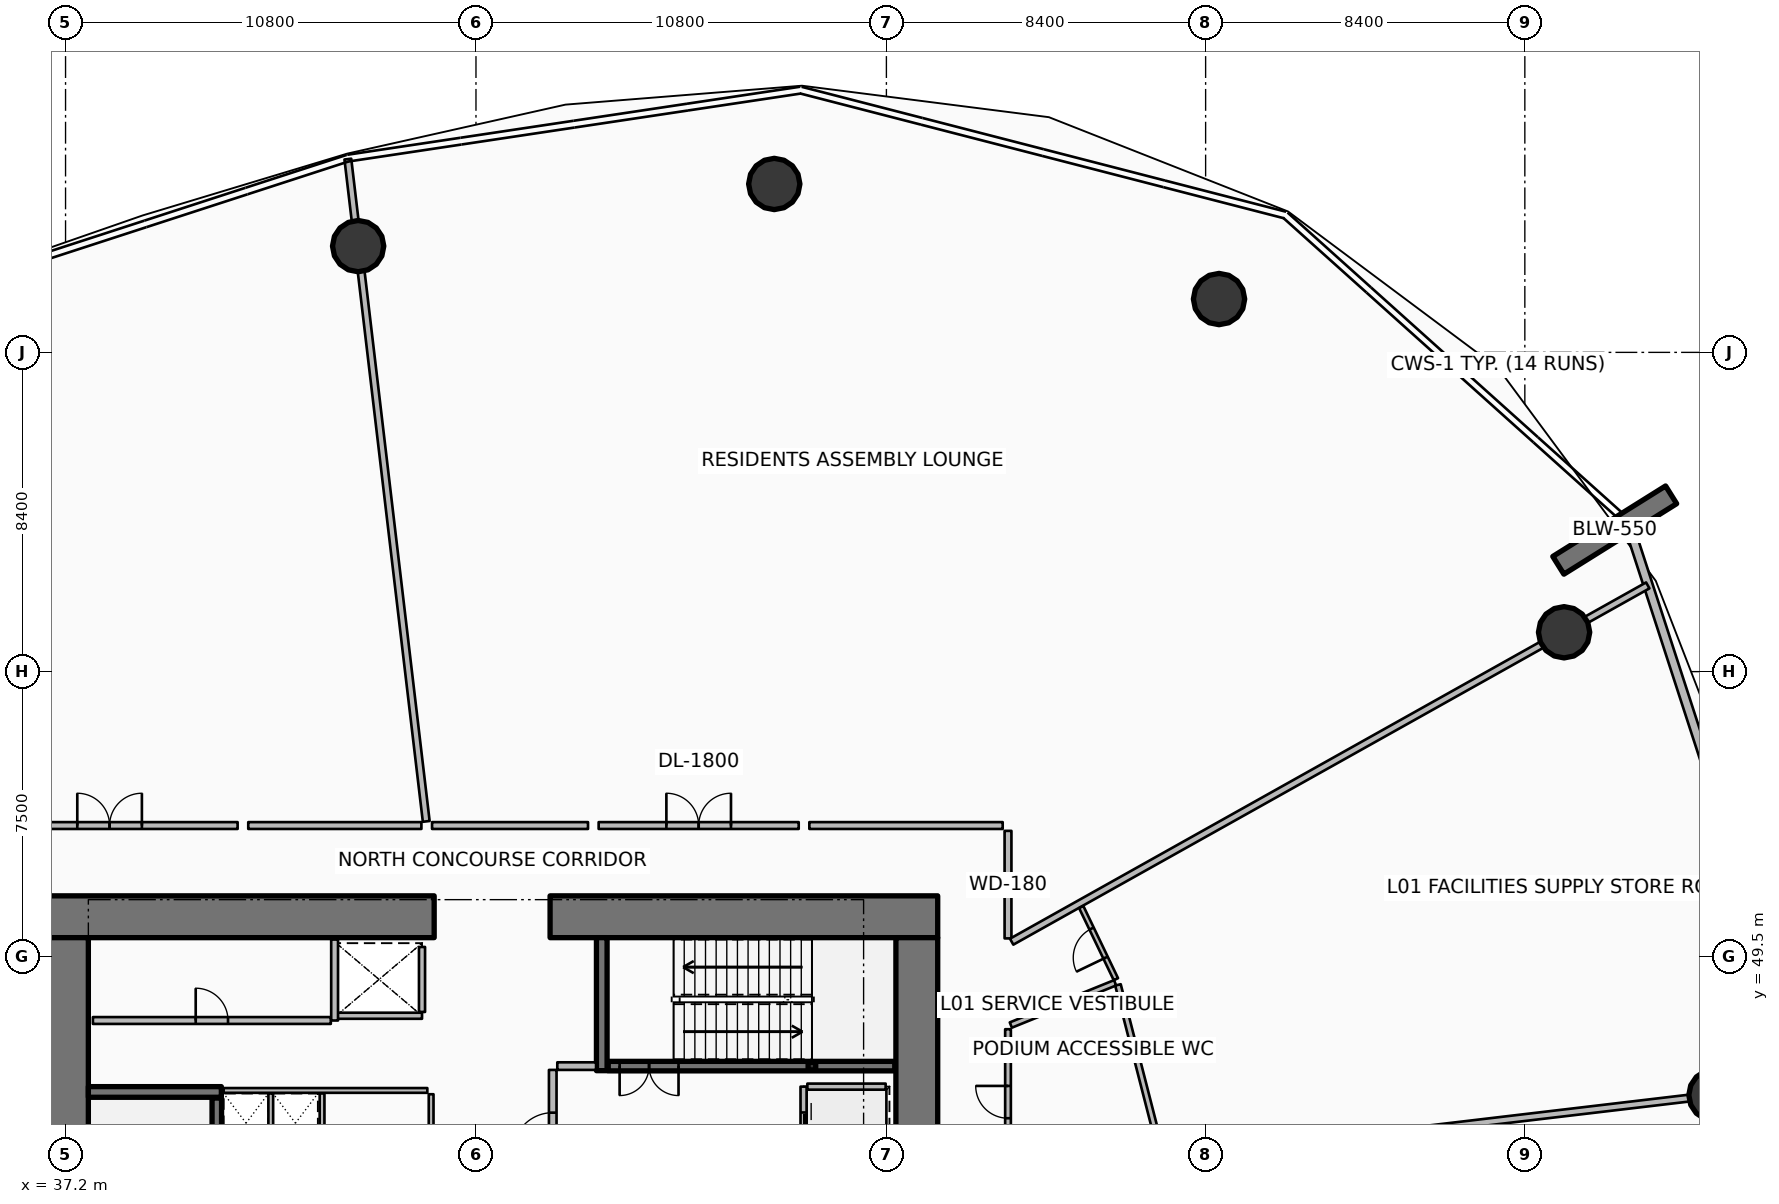
"""IFC4 building model, lengths in metres.
Left out: names, types, materials, properties, quantities, classifications, styles, units other than length and angle.
Written with IfcOpenShell. Run it as: python <this file> out.ifc"""

import sys

from ifc_helpers import new_model, si_unit, direction, frame, frame_2d, origin, origin_2d, place, context, subcontext, project, spatial, rectangle, hollow_rectangle, circle, extrude, element, fill, save


model = new_model("IFC4")
c1 = context("Model", 3, precision=1e-05, world=origin(), true_north=direction((0.0, 1.0)))
c2 = subcontext(c1, "Body", "Model", "MODEL_VIEW")
j1 = project(units=[si_unit("LENGTHUNIT", "METRE"), si_unit("PLANEANGLEUNIT", "RADIAN")], contexts=[c1])
p1 = place(None, origin())
s1 = spatial("IfcSite", under=j1, at=p1, CompositionType="ELEMENT")
p2 = place(p1, origin())
s2 = spatial("IfcBuilding", under=s1, at=p2, CompositionType="ELEMENT")
p3 = place(p2, frame((0.0, 0.0, 7.2)))
s3 = spatial("IfcBuildingStorey", under=s2, at=p3, CompositionType="ELEMENT", Elevation=7.2)
for number, where, z_axis, x_axis in (
    (1, (36.7, 50.55, 0.0), (0.0, 0.0, 1.0), (1.0, 0.0, 0.0)),
    (2, (49.95, 50.55, 0.0), (0.0, 0.0, 1.0), (1.0, 0.0, 0.0)),
):
    element("IfcWall", number, at=place(p3, frame(where, z_axis=z_axis, x_axis=x_axis)), inside=s3, PredefinedType="SHEAR", context=c2, shape_type="SweptSolid", body=[
        extrude(rectangle(XDim=10.2, YDim=1.1, at=frame_2d((5.1, 0.0))), origin(), (0.0, 0.0, 1.0), 4.8),
    ])
for number, where, z_axis, x_axis in (
    (3, (37.25, 34.0, 0.0), (0.0, 0.0, 1.0), (0.0, 1.0, 0.0)),
    (4, (59.6, 34.0, 0.0), (0.0, 0.0, 1.0), (0.0, 1.0, 0.0)),
):
    element("IfcWall", number, at=place(p3, frame(where, z_axis=z_axis, x_axis=x_axis)), inside=s3, PredefinedType="SHEAR", context=c2, shape_type="SweptSolid", body=[
        extrude(rectangle(XDim=16.0, YDim=1.1, at=frame_2d((8.0, 0.0))), origin(), (0.0, 0.0, 1.0), 4.8),
    ])
for number, where, z_axis, x_axis in (
    (5, (37.8, 45.94, 0.0), (0.0, 0.0, 1.0), (1.0, 0.0, 0.0)),
    (6, (51.31, 46.5, 0.0), (0.0, 0.0, 1.0), (0.0, 1.0, 0.0)),
):
    element("IfcWall", number, at=place(p3, frame(where, z_axis=z_axis, x_axis=x_axis)), inside=s3, PredefinedType="SHEAR", context=c2, shape_type="SweptSolid", body=[
        extrude(rectangle(XDim=3.5, YDim=0.28, at=frame_2d((1.75, 0.0))), origin(), (0.0, 0.0, 1.0), 4.8),
    ])
p4 = place(p3, frame((56.84, 46.62, 0.0), z_axis=(0.0, 0.0, 1.0), x_axis=(1.0, 0.0, 0.0)))
e7 = element("IfcColumn", 7, at=p4, inside=s3, PredefinedType="COLUMN", context=c2, shape_type="SweptSolid", body=[
    extrude(hollow_rectangle(XDim=0.2, YDim=0.2, WallThickness=0.01, InnerFilletRadius=0.01, OuterFilletRadius=0.02, at=origin_2d()), origin(), (0.0, 0.0, 1.0), 2.195),
])
p5 = place(p3, frame((76.481, 59.797, 0.0), z_axis=(0.0, 0.0, 1.0), x_axis=(0.848053161125, 0.529911158502, 0.0)))
e8 = element("IfcWall", 8, at=p5, inside=s3, PredefinedType="SOLIDWALL", context=c2, shape_type="SweptSolid", body=[
    extrude(rectangle(XDim=3.5, YDim=0.55, at=frame_2d((1.75, 0.0))), origin(), (0.0, 0.0, 1.0), 4.8),
])
for number, where, z_axis, x_axis in (
    (9, (76.633, 58.035, 0.0), (0.0, 0.0, 1.0), (1.0, 0.0, 0.0)),
    (10, (67.553, 66.803, 0.0), (0.0, 0.0, 1.0), (1.0, 0.0, 0.0)),
    (11, (55.849, 69.831, 0.0), (0.0, 0.0, 1.0), (1.0, 0.0, 0.0)),
    (12, (44.899, 68.196, 0.0), (0.0, 0.0, 1.0), (1.0, 0.0, 0.0)),
    (13, (80.59, 45.857, 0.0), (0.0, 0.0, 1.0), (1.0, 0.0, 0.0)),
):
    element("IfcColumn", number, at=place(p3, frame(where, z_axis=z_axis, x_axis=x_axis)), inside=s3, PredefinedType="COLUMN", context=c2, shape_type="SweptSolid", body=[
        extrude(circle(Radius=0.675, at=origin_2d()), origin(), (0.0, 0.0, 1.0), 4.48),
    ])
p6 = place(p3, frame((83.573, 44.725, 0.0), z_axis=(0.0, 0.0, 1.0), x_axis=(-0.309022005354, 0.951054888115, 0.0)))
e14 = element("IfcWall", 14, at=p6, inside=s3, PredefinedType="SOLIDWALL", context=c2, shape_type="SweptSolid", body=[
    extrude(rectangle(XDim=16.803, YDim=0.24, at=frame_2d((8.401, 0.0))), origin(), (0.0, 0.0, 1.0), 3.43),
])
p7 = place(p6, frame((7.201, 0.0, 0.85)))
e15 = element("IfcOpeningElement", 15, at=p7, cuts=e14, PredefinedType="OPENING", context=c2, shape_type="SweptSolid", body=[
    extrude(rectangle(XDim=2.4, YDim=2.1, at=frame_2d((1.2, 1.05))), frame((0.0, 0.13, 0.0), z_axis=(0.0, -1.0, 0.0), x_axis=(1.0, 0.0, 0.0)), (0.0, 0.0, 1.0), 0.26),
])
p8 = place(p3, frame((41.18, 38.22, 0.0), z_axis=(0.0, 0.0, 1.0), x_axis=(0.0, 1.0, 0.0)))
e16 = element("IfcWall", 16, at=p8, inside=s3, PredefinedType="SOLIDWALL", context=c2, shape_type="SweptSolid", body=[
    extrude(rectangle(XDim=7.56, YDim=0.25, at=frame_2d((3.78, 0.0))), origin(), (0.0, 0.0, 1.0), 4.48),
])
p9 = place(p8, frame((0.3, 0.0, 0.0)))
e17 = element("IfcOpeningElement", 17, at=p9, cuts=e16, PredefinedType="OPENING", context=c2, shape_type="SweptSolid", body=[
    extrude(rectangle(XDim=1.55, YDim=2.15, at=frame_2d((0.775, 1.075))), frame((0.0, 0.135, 0.0), z_axis=(0.0, -1.0, 0.0), x_axis=(1.0, 0.0, 0.0)), (0.0, 0.0, 1.0), 0.27),
])
p10 = place(p3, frame((51.48, 46.62, 0.0), z_axis=(0.0, 0.0, 1.0), x_axis=(1.0, 0.0, 0.0)))
e18 = element("IfcWall", 18, at=p10, inside=s3, PredefinedType="SOLIDWALL", context=c2, shape_type="SweptSolid", body=[
    extrude(rectangle(XDim=7.54, YDim=0.25, at=frame_2d((3.77, 0.0))), origin(), (0.0, 0.0, 1.0), 4.48),
])
p11 = place(p10, frame((0.3, 0.0, 0.0)))
e19 = element("IfcOpeningElement", 19, at=p11, cuts=e18, PredefinedType="OPENING", context=c2, shape_type="SweptSolid", body=[
    extrude(rectangle(XDim=1.55, YDim=2.15, at=frame_2d((0.775, 1.075))), frame((0.0, 0.135, 0.0), z_axis=(0.0, -1.0, 0.0), x_axis=(1.0, 0.0, 0.0)), (0.0, 0.0, 1.0), 0.27),
])
p12 = place(p3, frame((46.58, 47.945, 0.0), z_axis=(0.0, 0.0, 1.0), x_axis=(-1.0, 0.0, 0.0)))
e20 = element("IfcWall", 20, at=p12, inside=s3, PredefinedType="PARTITIONING", context=c2, shape_type="SweptSolid", body=[
    extrude(rectangle(XDim=2.26, YDim=0.16, at=frame_2d((1.13, 0.0))), origin(), (0.0, 0.0, 1.0), 4.48),
])
p13 = place(p3, frame((46.58, 48.045, 0.0), z_axis=(0.0, 0.0, 1.0), x_axis=(0.0, 1.0, 0.0)))
e21 = element("IfcWall", 21, at=p13, inside=s3, PredefinedType="PARTITIONING", context=c2, shape_type="SweptSolid", body=[
    extrude(rectangle(XDim=1.71, YDim=0.16, at=frame_2d((0.855, 0.0))), origin(), (0.0, 0.0, 1.0), 4.48),
])
p14 = place(p3, frame((56.62, 46.08, 0.0), z_axis=(0.0, 0.0, 1.0), x_axis=(0.0, -1.0, 0.0)))
e22 = element("IfcWall", 22, at=p14, inside=s3, PredefinedType="PARTITIONING", context=c2, shape_type="SweptSolid", body=[
    extrude(rectangle(XDim=2.46, YDim=0.16, at=frame_2d((1.23, 0.0))), origin(), (0.0, 0.0, 1.0), 4.48),
])
p15 = place(p14, frame((0.68, 0.0, 0.0)))
e23 = element("IfcOpeningElement", 23, at=p15, cuts=e22, PredefinedType="OPENING", context=c2, shape_type="SweptSolid", body=[
    extrude(rectangle(XDim=1.1, YDim=2.1, at=frame_2d((0.55, 1.05))), frame((0.0, 0.09, 0.0), z_axis=(0.0, -1.0, 0.0), x_axis=(1.0, 0.0, 0.0)), (0.0, 0.0, 1.0), 0.18),
])
p16 = place(p3, frame((56.72, 46.08, 0.0), z_axis=(0.0, 0.0, 1.0), x_axis=(1.0, 0.0, 0.0)))
e24 = element("IfcWall", 24, at=p16, inside=s3, PredefinedType="PARTITIONING", context=c2, shape_type="SweptSolid", body=[
    extrude(rectangle(XDim=2.06, YDim=0.16, at=frame_2d((1.03, 0.0))), origin(), (0.0, 0.0, 1.0), 4.48),
])
p17 = place(p3, frame((37.92, 47.82, 0.0), z_axis=(0.0, 0.0, 1.0), x_axis=(1.0, 0.0, 0.0)))
e25 = element("IfcWall", 25, at=p17, inside=s3, PredefinedType="PARTITIONING", context=c2, shape_type="SweptSolid", body=[
    extrude(rectangle(XDim=6.26, YDim=0.18, at=frame_2d((3.13, 0.0))), origin(), (0.0, 0.0, 1.0), 4.48),
])
p18 = place(p17, frame((2.705, 0.0, 0.0)))
e26 = element("IfcOpeningElement", 26, at=p18, cuts=e25, PredefinedType="OPENING", context=c2, shape_type="SweptSolid", body=[
    extrude(rectangle(XDim=0.85, YDim=2.06, at=frame_2d((0.425, 1.03))), frame((0.0, 0.1, 0.0), z_axis=(0.0, -1.0, 0.0), x_axis=(1.0, 0.0, 0.0)), (0.0, 0.0, 1.0), 0.2),
])
p19 = place(p3, frame((44.28, 47.82, 0.0), z_axis=(0.0, 0.0, 1.0), x_axis=(0.0, 1.0, 0.0)))
e27 = element("IfcWall", 27, at=p19, inside=s3, PredefinedType="PARTITIONING", context=c2, shape_type="SweptSolid", body=[
    extrude(rectangle(XDim=2.13, YDim=0.18, at=frame_2d((1.065, 0.0))), origin(), (0.0, 0.0, 1.0), 4.48),
])
p20 = place(p3, frame((50.14, 46.62, 0.0), z_axis=(0.0, 0.0, 1.0), x_axis=(1.0, 0.0, 0.0)))
e28 = element("IfcWall", 28, at=p20, inside=s3, PredefinedType="PARTITIONING", context=c2, shape_type="SweptSolid", body=[
    extrude(rectangle(XDim=1.02, YDim=0.2, at=frame_2d((0.51, 0.0))), origin(), (0.0, 0.0, 1.0), 4.48),
])
p21 = place(p3, frame((50.02, 43.22, 0.0), z_axis=(0.0, 0.0, 1.0), x_axis=(0.0, 1.0, 0.0)))
e29 = element("IfcWall", 29, at=p21, inside=s3, PredefinedType="PARTITIONING", context=c2, shape_type="SweptSolid", body=[
    extrude(rectangle(XDim=3.3, YDim=0.2, at=frame_2d((1.65, 0.0))), origin(), (0.0, 0.0, 1.0), 4.48),
])
p22 = place(p21, frame((1.125, 0.0, 0.0)))
e30 = element("IfcOpeningElement", 30, at=p22, cuts=e29, PredefinedType="OPENING", context=c2, shape_type="SweptSolid", body=[
    extrude(rectangle(XDim=1.05, YDim=2.1, at=frame_2d((0.525, 1.05))), frame((0.0, 0.11, 0.0), z_axis=(0.0, -1.0, 0.0), x_axis=(1.0, 0.0, 0.0)), (0.0, 0.0, 1.0), 0.22),
])
p23 = place(p3, frame((41.36, 45.98, 0.0), z_axis=(0.0, 0.0, 1.0), x_axis=(1.0, 0.0, 0.0)))
e31 = element("IfcWall", 31, at=p23, inside=s3, PredefinedType="PARTITIONING", context=c2, shape_type="SweptSolid", body=[
    extrude(rectangle(XDim=5.36, YDim=0.125, at=frame_2d((2.68, 0.0))), origin(), (0.0, 0.0, 1.0), 3.92),
])
p24 = place(p3, frame((42.6, 44.35, 0.0), z_axis=(0.0, 0.0, 1.0), x_axis=(0.0, 1.0, 0.0)))
e32 = element("IfcWall", 32, at=p24, inside=s3, PredefinedType="PARTITIONING", context=c2, shape_type="SweptSolid", body=[
    extrude(rectangle(XDim=1.55, YDim=0.125, at=frame_2d((0.775, 0.0))), origin(), (0.0, 0.0, 1.0), 3.92),
])
p25 = place(p3, frame((43.95, 41.58, 0.0), z_axis=(0.0, 0.0, 1.0), x_axis=(0.0, 1.0, 0.0)))
e33 = element("IfcWall", 33, at=p25, inside=s3, PredefinedType="PARTITIONING", context=c2, shape_type="SweptSolid", body=[
    extrude(rectangle(XDim=4.32, YDim=0.125, at=frame_2d((2.16, 0.0))), origin(), (0.0, 0.0, 1.0), 3.92),
])
p26 = place(p3, frame((46.82, 41.58, 0.0), z_axis=(0.0, 0.0, 1.0), x_axis=(0.0, 1.0, 0.0)))
e34 = element("IfcWall", 34, at=p26, inside=s3, PredefinedType="PARTITIONING", context=c2, shape_type="SweptSolid", body=[
    extrude(rectangle(XDim=4.3, YDim=0.125, at=frame_2d((2.15, 0.0))), origin(), (0.0, 0.0, 1.0), 3.92),
])
p27 = place(p26, frame((1.725, 0.0, 0.0)))
e35 = element("IfcOpeningElement", 35, at=p27, cuts=e34, PredefinedType="OPENING", context=c2, shape_type="SweptSolid", body=[
    extrude(rectangle(XDim=0.85, YDim=2.06, at=frame_2d((0.425, 1.03))), frame((0.0, 0.073, 0.0), z_axis=(0.0, -1.0, 0.0), x_axis=(1.0, 0.0, 0.0)), (0.0, 0.0, 1.0), 0.145),
])
p28 = place(p3, frame((62.0, 49.98, 0.0), z_axis=(0.0, 0.0, 1.0), x_axis=(0.0, 1.0, 0.0)))
e36 = element("IfcWall", 36, at=p28, inside=s3, PredefinedType="PARTITIONING", context=c2, shape_type="SweptSolid", body=[
    extrude(rectangle(XDim=2.83, YDim=0.18, at=frame_2d((1.415, 0.0))), origin(), (0.0, 0.0, 1.0), 3.693),
])
p29 = place(p3, frame((61.86, 52.95, 0.0), z_axis=(0.0, 0.0, 1.0), x_axis=(-1.0, 0.0, 0.0)))
e37 = element("IfcWall", 37, at=p29, inside=s3, PredefinedType="PARTITIONING", context=c2, shape_type="SweptSolid", body=[
    extrude(rectangle(XDim=5.088, YDim=0.18, at=frame_2d((2.544, 0.0))), origin(), (0.0, 0.0, 1.0), 3.693),
])
p30 = place(p3, frame((56.492, 52.95, 0.0), z_axis=(0.0, 0.0, 1.0), x_axis=(-1.0, 0.0, 0.0)))
e38 = element("IfcWall", 38, at=p30, inside=s3, PredefinedType="PARTITIONING", context=c2, shape_type="SweptSolid", body=[
    extrude(rectangle(XDim=5.264, YDim=0.18, at=frame_2d((2.632, 0.0))), origin(), (0.0, 0.0, 1.0), 3.693),
])
p31 = place(p30, frame((1.782, 0.0, 0.0)))
e39 = element("IfcOpeningElement", 39, at=p31, cuts=e38, PredefinedType="OPENING", context=c2, shape_type="SweptSolid", body=[
    extrude(rectangle(XDim=1.7, YDim=2.15, at=frame_2d((0.85, 1.075))), frame((0.0, 0.1, 0.0), z_axis=(0.0, -1.0, 0.0), x_axis=(1.0, 0.0, 0.0)), (0.0, 0.0, 1.0), 0.2),
])
p32 = place(p3, frame((50.948, 52.95, 0.0), z_axis=(0.0, 0.0, 1.0), x_axis=(-1.0, 0.0, 0.0)))
e40 = element("IfcWall", 40, at=p32, inside=s3, PredefinedType="PARTITIONING", context=c2, shape_type="SweptSolid", body=[
    extrude(rectangle(XDim=4.104, YDim=0.18, at=frame_2d((2.052, 0.0))), origin(), (0.0, 0.0, 1.0), 3.693),
])
p33 = place(p3, frame((62.096, 49.894, 0.0), z_axis=(0.0, 0.0, 1.0), x_axis=(0.872490608205, 0.488630881744, 0.0)))
e41 = element("IfcWall", 41, at=p33, inside=s3, PredefinedType="PARTITIONING", context=c2, shape_type="SweptSolid", body=[
    extrude(rectangle(XDim=19.185, YDim=0.18, at=frame_2d((9.592, 0.0))), origin(), (0.0, 0.0, 1.0), 3.693),
])
p34 = place(p3, frame((46.691, 53.059, 0.0), z_axis=(0.0, 0.0, 1.0), x_axis=(-0.117547531601, 0.993067257448, 0.0)))
e42 = element("IfcWall", 42, at=p34, inside=s3, PredefinedType="PARTITIONING", context=c2, shape_type="SweptSolid", body=[
    extrude(rectangle(XDim=17.548, YDim=0.18, at=frame_2d((8.774, 0.0))), origin(), (0.0, 0.0, 1.0), 3.693),
])
p35 = place(p3, frame((46.564, 52.95, 0.0), z_axis=(0.0, 0.0, 1.0), x_axis=(-1.0, 0.0, 0.0)))
e43 = element("IfcWall", 43, at=p35, inside=s3, PredefinedType="PARTITIONING", context=c2, shape_type="SweptSolid", body=[
    extrude(rectangle(XDim=4.556, YDim=0.18, at=frame_2d((2.278, 0.0))), origin(), (0.0, 0.0, 1.0), 3.693),
])
p36 = place(p3, frame((41.728, 52.95, 0.0), z_axis=(0.0, 0.0, 1.0), x_axis=(-1.0, 0.0, 0.0)))
e44 = element("IfcWall", 44, at=p36, inside=s3, PredefinedType="PARTITIONING", context=c2, shape_type="SweptSolid", body=[
    extrude(rectangle(XDim=6.738, YDim=0.18, at=frame_2d((3.369, 0.0))), origin(), (0.0, 0.0, 1.0), 3.693),
])
p37 = place(p36, frame((2.519, 0.0, 0.0)))
e45 = element("IfcOpeningElement", 45, at=p37, cuts=e44, PredefinedType="OPENING", context=c2, shape_type="SweptSolid", body=[
    extrude(rectangle(XDim=1.7, YDim=2.15, at=frame_2d((0.85, 1.075))), frame((0.0, 0.1, 0.0), z_axis=(0.0, -1.0, 0.0), x_axis=(1.0, 0.0, 0.0)), (0.0, 0.0, 1.0), 0.2),
])
p38 = place(p3, frame((62.109, 43.67, 0.0), z_axis=(0.0, 0.0, 1.0), x_axis=(0.993068665713, 0.117535633659, 0.0)))
e46 = element("IfcWall", 46, at=p38, inside=s3, PredefinedType="PARTITIONING", context=c2, shape_type="SweptSolid", body=[
    extrude(rectangle(XDim=21.133, YDim=0.18, at=frame_2d((10.566, 0.0))), origin(), (0.0, 0.0, 1.0), 3.693),
])
p39 = place(p3, frame((62.0, 43.757, 0.0), z_axis=(0.0, 0.0, 1.0), x_axis=(0.0, 1.0, 0.0)))
e47 = element("IfcWall", 47, at=p39, inside=s3, PredefinedType="PARTITIONING", context=c2, shape_type="SweptSolid", body=[
    extrude(rectangle(XDim=3.833, YDim=0.15, at=frame_2d((1.917, 0.0))), origin(), (0.0, 0.0, 1.0), 3.693),
])
p40 = place(p39, frame((1.492, 0.0, 0.0)))
e48 = element("IfcOpeningElement", 48, at=p40, cuts=e47, PredefinedType="OPENING", context=c2, shape_type="SweptSolid", body=[
    extrude(rectangle(XDim=0.85, YDim=2.06, at=frame_2d((0.425, 1.03))), frame((0.0, 0.085, 0.0), z_axis=(0.0, -1.0, 0.0), x_axis=(1.0, 0.0, 0.0)), (0.0, 0.0, 1.0), 0.17),
])
p41 = place(p3, frame((62.074, 47.701, 0.0), z_axis=(0.0, 0.0, 1.0), x_axis=(0.926852538468, 0.375425587747, 0.0)))
e49 = element("IfcWall", 49, at=p41, inside=s3, PredefinedType="PARTITIONING", context=c2, shape_type="SweptSolid", body=[
    extrude(rectangle(XDim=2.96, YDim=0.15, at=frame_2d((1.48, 0.0))), origin(), (0.0, 0.0, 1.0), 3.92),
])
p42 = place(p3, frame((66.054, 44.237, 0.0), z_axis=(0.0, 0.0, 1.0), x_axis=(-0.248710144761, 0.968577959636, 0.0)))
e50 = element("IfcWall", 50, at=p42, inside=s3, PredefinedType="PARTITIONING", context=c2, shape_type="SweptSolid", body=[
    extrude(rectangle(XDim=4.667, YDim=0.15, at=frame_2d((2.333, 0.0))), origin(), (0.0, 0.0, 1.0), 3.693),
])
p43 = place(p3, frame((64.839, 48.906, 0.0), z_axis=(0.0, 0.0, 1.0), x_axis=(-0.432923235959, 0.901430791446, 0.0)))
e51 = element("IfcWall", 51, at=p43, inside=s3, PredefinedType="PARTITIONING", context=c2, shape_type="SweptSolid", body=[
    extrude(rectangle(XDim=2.106, YDim=0.125, at=frame_2d((1.053, 0.0))), origin(), (0.0, 0.0, 1.0), 3.693),
])
p44 = place(p43, frame((0.628, 0.0, 0.0)))
e52 = element("IfcOpeningElement", 52, at=p44, cuts=e51, PredefinedType="OPENING", context=c2, shape_type="SweptSolid", body=[
    extrude(rectangle(XDim=0.85, YDim=2.06, at=frame_2d((0.425, 1.03))), frame((0.0, 0.073, 0.0), z_axis=(0.0, -1.0, 0.0), x_axis=(1.0, 0.0, 0.0)), (0.0, 0.0, 1.0), 0.145),
])
p45 = place(p11, origin())
e53 = element("IfcDoor", 53, at=p45, inside=s3, OperationType="DOUBLE_DOOR_SINGLE_SWING", PredefinedType="DOOR", context=c2, shape_type="SweptSolid", body=[
    extrude(rectangle(XDim=1.55, YDim=2.15, at=frame_2d((0.775, 1.075))), frame((0.0, 0.025, 0.0), z_axis=(0.0, -1.0, 0.0), x_axis=(1.0, 0.0, 0.0)), (0.0, 0.0, 1.0), 0.05),
])
fill(e19, e53)
p46 = place(p15, origin())
e54 = element("IfcDoor", 54, at=p46, inside=s3, OperationType="DOUBLE_DOOR_SLIDING", PredefinedType="DOOR", context=c2, shape_type="SweptSolid", body=[
    extrude(rectangle(XDim=1.1, YDim=2.1, at=frame_2d((0.55, 1.05))), frame((0.0, 0.025, 0.0), z_axis=(0.0, -1.0, 0.0), x_axis=(1.0, 0.0, 0.0)), (0.0, 0.0, 1.0), 0.05),
])
fill(e23, e54)
p47 = place(p18, origin())
e55 = element("IfcDoor", 55, at=p47, inside=s3, OperationType="SINGLE_SWING_LEFT", PredefinedType="DOOR", context=c2, shape_type="SweptSolid", body=[
    extrude(rectangle(XDim=0.85, YDim=2.06, at=frame_2d((0.425, 1.03))), frame((0.0, 0.025, 0.0), z_axis=(0.0, -1.0, 0.0), x_axis=(1.0, 0.0, 0.0)), (0.0, 0.0, 1.0), 0.05),
])
fill(e26, e55)
p48 = place(p22, origin())
e56 = element("IfcDoor", 56, at=p48, inside=s3, OperationType="SINGLE_SWING_LEFT", PredefinedType="DOOR", context=c2, shape_type="SweptSolid", body=[
    extrude(rectangle(XDim=1.05, YDim=2.1, at=frame_2d((0.525, 1.05))), frame((0.0, 0.025, 0.0), z_axis=(0.0, -1.0, 0.0), x_axis=(1.0, 0.0, 0.0)), (0.0, 0.0, 1.0), 0.05),
])
fill(e30, e56)
p49 = place(p31, origin())
e57 = element("IfcDoor", 57, at=p49, inside=s3, OperationType="DOUBLE_DOOR_SINGLE_SWING", PredefinedType="DOOR", context=c2, shape_type="SweptSolid", body=[
    extrude(rectangle(XDim=1.7, YDim=2.15, at=frame_2d((0.85, 1.075))), frame((0.0, 0.025, 0.0), z_axis=(0.0, -1.0, 0.0), x_axis=(1.0, 0.0, 0.0)), (0.0, 0.0, 1.0), 0.05),
])
fill(e39, e57)
p50 = place(p37, origin())
e58 = element("IfcDoor", 58, at=p50, inside=s3, OperationType="DOUBLE_DOOR_SINGLE_SWING", PredefinedType="DOOR", context=c2, shape_type="SweptSolid", body=[
    extrude(rectangle(XDim=1.7, YDim=2.15, at=frame_2d((0.85, 1.075))), frame((0.0, 0.025, 0.0), z_axis=(0.0, -1.0, 0.0), x_axis=(1.0, 0.0, 0.0)), (0.0, 0.0, 1.0), 0.05),
])
fill(e45, e58)
p51 = place(p40, origin())
e59 = element("IfcDoor", 59, at=p51, inside=s3, OperationType="SINGLE_SWING_RIGHT", PredefinedType="DOOR", context=c2, shape_type="SweptSolid", body=[
    extrude(rectangle(XDim=0.85, YDim=2.06, at=frame_2d((0.425, 1.03))), frame((0.0, 0.025, 0.0), z_axis=(0.0, -1.0, 0.0), x_axis=(1.0, 0.0, 0.0)), (0.0, 0.0, 1.0), 0.05),
])
fill(e48, e59)
p52 = place(p44, origin())
e60 = element("IfcDoor", 60, at=p52, inside=s3, OperationType="SINGLE_SWING_LEFT", PredefinedType="DOOR", context=c2, shape_type="SweptSolid", body=[
    extrude(rectangle(XDim=0.85, YDim=2.06, at=frame_2d((0.425, 1.03))), frame((0.0, 0.025, 0.0), z_axis=(0.0, -1.0, 0.0), x_axis=(1.0, 0.0, 0.0)), (0.0, 0.0, 1.0), 0.05),
])
fill(e52, e60)
save(model, sys.argv[1])
